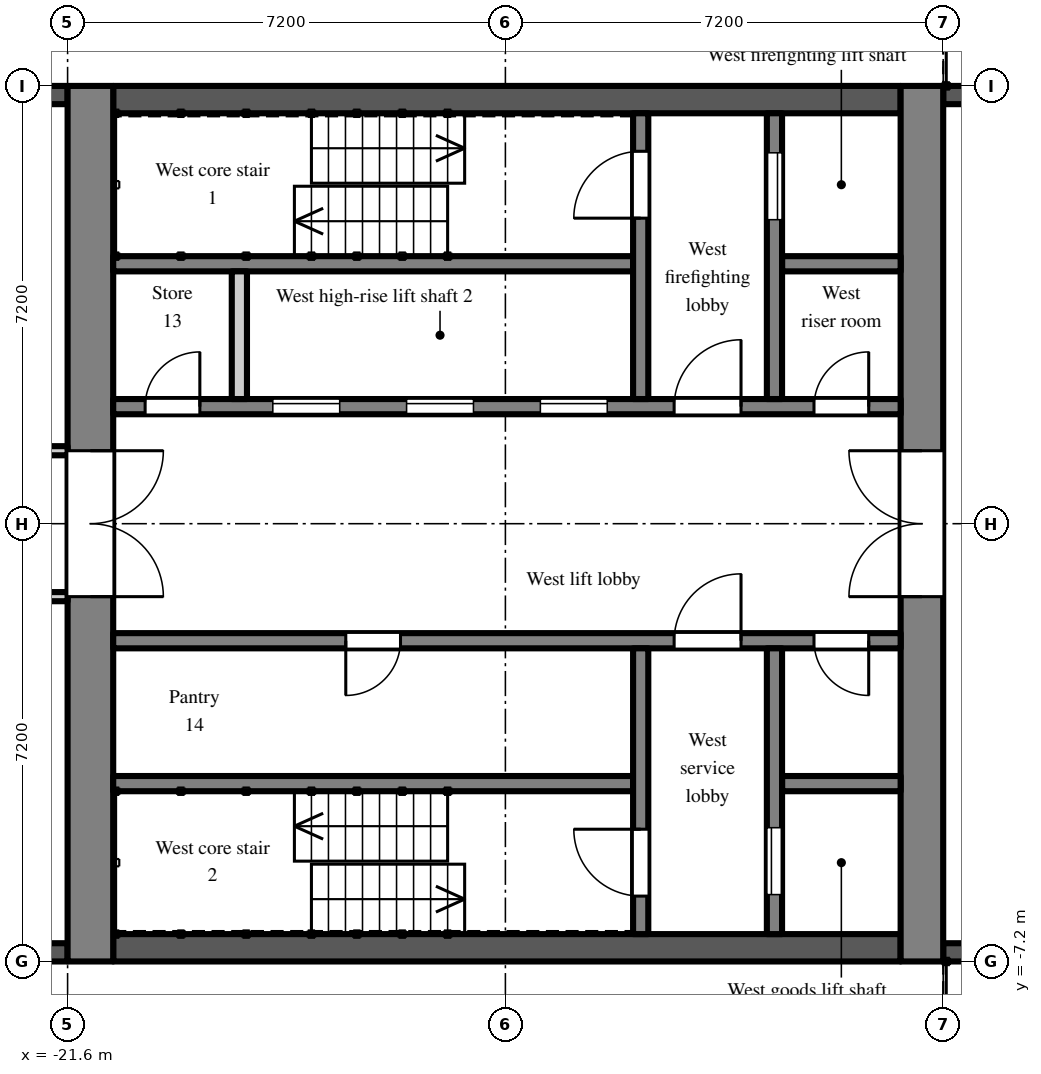
"""IFC4 building model, lengths in metres.
Left out: names, types, materials, properties, quantities, classifications, styles, units other than length and angle.
Written with IfcOpenShell. Run it as: python <this file> out.ifc"""

import sys

from ifc_helpers import new_model, si_unit, direction, frame, frame_2d, origin, place, context, subcontext, project, spatial, rectangle, extrude, element, fill, save


model = new_model("IFC4")
c1 = context("Model", 3, precision=1e-05, world=origin(), true_north=direction((0.0, 1.0)))
c2 = subcontext(c1, "Body", "Model", "MODEL_VIEW")
j1 = project(units=[si_unit("LENGTHUNIT", "METRE"), si_unit("PLANEANGLEUNIT", "RADIAN")], contexts=[c1])
p1 = place(None, origin())
s1 = spatial("IfcSite", under=j1, at=p1, CompositionType="ELEMENT")
p2 = place(p1, origin())
s2 = spatial("IfcBuilding", under=s1, at=p2, CompositionType="ELEMENT")
p3 = place(p2, frame((0.0, 0.0, 156.3)))
s3 = spatial("IfcBuildingStorey", under=s2, at=p3, CompositionType="ELEMENT", Elevation=156.3)
p4 = place(p3, frame((-4.2, 7.05, 0.0), z_axis=(0.0, 0.0, 1.0), x_axis=(-1.0, 0.0, 0.0)))
e1 = element("IfcWall", 1, at=p4, inside=s3, PredefinedType="SOLIDWALL", context=c2, shape_type="SweptSolid", body=[
    extrude(rectangle(XDim=3.0, YDim=0.3, at=frame_2d((1.5, 0.0))), origin(), (0.0, 0.0, 1.0), 2.2),
])
p5 = place(p3, frame((-21.6, 7.05, 0.0), z_axis=(0.0, 0.0, 1.0), x_axis=(-1.0, 0.0, 0.0)))
e2 = element("IfcWall", 2, at=p5, inside=s3, PredefinedType="SOLIDWALL", context=c2, shape_type="SweptSolid", body=[
    extrude(rectangle(XDim=2.7, YDim=0.3, at=frame_2d((1.35, 0.0))), origin(), (0.0, 0.0, 1.0), 2.2),
])
p6 = place(p5, frame((0.75, 0.0, 0.2)))
e3 = element("IfcOpeningElement", 3, at=p6, cuts=e2, PredefinedType="OPENING", context=c2, shape_type="SweptSolid", body=[
    extrude(rectangle(XDim=1.2, YDim=1.85, at=frame_2d((0.6, 0.925))), frame((0.0, 0.16, 0.0), z_axis=(0.0, -1.0, 0.0), x_axis=(1.0, 0.0, 0.0)), (0.0, 0.0, 1.0), 0.32),
])
p7 = place(p3, frame((-24.3, -7.05, 0.0), z_axis=(0.0, 0.0, 1.0), x_axis=(1.0, 0.0, 0.0)))
e4 = element("IfcWall", 4, at=p7, inside=s3, PredefinedType="SOLIDWALL", context=c2, shape_type="SweptSolid", body=[
    extrude(rectangle(XDim=2.7, YDim=0.3, at=frame_2d((1.35, 0.0))), origin(), (0.0, 0.0, 1.0), 2.2),
])
p8 = place(p3, frame((-7.2, -7.05, 0.0), z_axis=(0.0, 0.0, 1.0), x_axis=(1.0, 0.0, 0.0)))
e5 = element("IfcWall", 5, at=p8, inside=s3, PredefinedType="SOLIDWALL", context=c2, shape_type="SweptSolid", body=[
    extrude(rectangle(XDim=3.0, YDim=0.3, at=frame_2d((1.5, 0.0))), origin(), (0.0, 0.0, 1.0), 2.2),
])
p9 = place(p3, frame((-7.55, -7.2, 0.0), z_axis=(0.0, 0.0, 1.0), x_axis=(0.0, 1.0, 0.0)))
e6 = element("IfcWall", 6, at=p9, inside=s3, PredefinedType="SHEAR", context=c2, shape_type="SweptSolid", body=[
    extrude(rectangle(XDim=14.4, YDim=0.7, at=frame_2d((7.2, 0.0))), origin(), (0.0, 0.0, 1.0), 2.6),
])
p10 = place(p9, frame((6.0, 0.0, 0.0)))
e7 = element("IfcOpeningElement", 7, at=p10, cuts=e6, PredefinedType="OPENING", context=c2, shape_type="SweptSolid", body=[
    extrude(rectangle(XDim=2.4, YDim=2.2, at=frame_2d((1.2, 1.1))), frame((0.0, 0.36, 0.0), z_axis=(0.0, -1.0, 0.0), x_axis=(1.0, 0.0, 0.0)), (0.0, 0.0, 1.0), 0.72),
])
p11 = place(p3, frame((-21.225, -7.2, 0.0), z_axis=(0.0, 0.0, 1.0), x_axis=(0.0, 1.0, 0.0)))
e8 = element("IfcWall", 8, at=p11, inside=s3, PredefinedType="SHEAR", context=c2, shape_type="SweptSolid", body=[
    extrude(rectangle(XDim=14.4, YDim=0.75, at=frame_2d((7.2, 0.0))), origin(), (0.0, 0.0, 1.0), 2.6),
])
p12 = place(p11, frame((6.0, 0.0, 0.0)))
e9 = element("IfcOpeningElement", 9, at=p12, cuts=e8, PredefinedType="OPENING", context=c2, shape_type="SweptSolid", body=[
    extrude(rectangle(XDim=2.4, YDim=2.2, at=frame_2d((1.2, 1.1))), frame((0.0, 0.385, 0.0), z_axis=(0.0, -1.0, 0.0), x_axis=(1.0, 0.0, 0.0)), (0.0, 0.0, 1.0), 0.77),
])
p13 = place(p3, frame((-7.9, 6.975, 0.0), z_axis=(0.0, 0.0, 1.0), x_axis=(-1.0, 0.0, 0.0)))
e10 = element("IfcWall", 10, at=p13, inside=s3, PredefinedType="SHEAR", context=c2, shape_type="SweptSolid", body=[
    extrude(rectangle(XDim=12.95, YDim=0.45, at=frame_2d((6.475, 0.0))), origin(), (0.0, 0.0, 1.0), 2.6),
])
p14 = place(p3, frame((-7.9, 1.925, 0.0), z_axis=(0.0, 0.0, 1.0), x_axis=(-1.0, 0.0, 0.0)))
e11 = element("IfcWall", 11, at=p14, inside=s3, PredefinedType="SHEAR", context=c2, shape_type="SweptSolid", body=[
    extrude(rectangle(XDim=12.95, YDim=0.25, at=frame_2d((6.475, 0.0))), origin(), (0.0, 0.0, 1.0), 2.6),
])
p15 = place(p14, frame((4.825, 0.0, 0.0)))
e12 = element("IfcOpeningElement", 12, at=p15, cuts=e11, PredefinedType="OPENING", context=c2, shape_type="SweptSolid", body=[
    extrude(rectangle(XDim=1.1, YDim=2.1, at=frame_2d((0.55, 1.05))), frame((0.0, 0.135, 0.0), z_axis=(0.0, -1.0, 0.0), x_axis=(1.0, 0.0, 0.0)), (0.0, 0.0, 1.0), 0.27),
])
p16 = place(p14, frame((7.025, 0.0, 0.0)))
e13 = element("IfcOpeningElement", 13, at=p16, cuts=e11, PredefinedType="OPENING", context=c2, shape_type="SweptSolid", body=[
    extrude(rectangle(XDim=1.1, YDim=2.1, at=frame_2d((0.55, 1.05))), frame((0.0, 0.135, 0.0), z_axis=(0.0, -1.0, 0.0), x_axis=(1.0, 0.0, 0.0)), (0.0, 0.0, 1.0), 0.27),
])
p17 = place(p14, frame((9.225, 0.0, 0.0)))
e14 = element("IfcOpeningElement", 14, at=p17, cuts=e11, PredefinedType="OPENING", context=c2, shape_type="SweptSolid", body=[
    extrude(rectangle(XDim=1.1, YDim=2.1, at=frame_2d((0.55, 1.05))), frame((0.0, 0.135, 0.0), z_axis=(0.0, -1.0, 0.0), x_axis=(1.0, 0.0, 0.0)), (0.0, 0.0, 1.0), 0.27),
])
p18 = place(p14, frame((0.525, 0.0, 0.0)))
e15 = element("IfcOpeningElement", 15, at=p18, cuts=e11, PredefinedType="OPENING", context=c2, shape_type="SweptSolid", body=[
    extrude(rectangle(XDim=0.9, YDim=2.1, at=frame_2d((0.45, 1.05))), frame((0.0, 0.135, 0.0), z_axis=(0.0, -1.0, 0.0), x_axis=(1.0, 0.0, 0.0)), (0.0, 0.0, 1.0), 0.27),
])
p19 = place(p14, frame((2.625, 0.0, 0.0)))
e16 = element("IfcOpeningElement", 16, at=p19, cuts=e11, PredefinedType="OPENING", context=c2, shape_type="SweptSolid", body=[
    extrude(rectangle(XDim=1.1, YDim=2.1, at=frame_2d((0.55, 1.05))), frame((0.0, 0.135, 0.0), z_axis=(0.0, -1.0, 0.0), x_axis=(1.0, 0.0, 0.0)), (0.0, 0.0, 1.0), 0.27),
])
p20 = place(p14, frame((11.525, 0.0, 0.0)))
e17 = element("IfcOpeningElement", 17, at=p20, cuts=e11, PredefinedType="OPENING", context=c2, shape_type="SweptSolid", body=[
    extrude(rectangle(XDim=0.9, YDim=2.1, at=frame_2d((0.45, 1.05))), frame((0.0, 0.135, 0.0), z_axis=(0.0, -1.0, 0.0), x_axis=(1.0, 0.0, 0.0)), (0.0, 0.0, 1.0), 0.27),
])
p21 = place(p3, frame((-7.9, 4.275, 0.0), z_axis=(0.0, 0.0, 1.0), x_axis=(-1.0, 0.0, 0.0)))
e18 = element("IfcWall", 18, at=p21, inside=s3, PredefinedType="SHEAR", context=c2, shape_type="SweptSolid", body=[
    extrude(rectangle(XDim=1.95, YDim=0.25, at=frame_2d((0.975, 0.0))), origin(), (0.0, 0.0, 1.0), 2.6),
])
p22 = place(p3, frame((-12.3, 4.275, 0.0), z_axis=(0.0, 0.0, 1.0), x_axis=(-1.0, 0.0, 0.0)))
e19 = element("IfcWall", 19, at=p22, inside=s3, PredefinedType="SHEAR", context=c2, shape_type="SweptSolid", body=[
    extrude(rectangle(XDim=8.55, YDim=0.25, at=frame_2d((4.275, 0.0))), origin(), (0.0, 0.0, 1.0), 2.6),
])
p23 = place(p3, frame((-9.975, 2.05, 0.0), z_axis=(0.0, 0.0, 1.0), x_axis=(0.0, 1.0, 0.0)))
e20 = element("IfcWall", 20, at=p23, inside=s3, PredefinedType="SHEAR", context=c2, shape_type="SweptSolid", body=[
    extrude(rectangle(XDim=4.7, YDim=0.25, at=frame_2d((2.35, 0.0))), origin(), (0.0, 0.0, 1.0), 2.6),
])
p24 = place(p23, frame((2.95, 0.0, 0.0)))
e21 = element("IfcOpeningElement", 21, at=p24, cuts=e20, PredefinedType="OPENING", context=c2, shape_type="SweptSolid", body=[
    extrude(rectangle(XDim=1.1, YDim=2.1, at=frame_2d((0.55, 1.05))), frame((0.0, 0.135, 0.0), z_axis=(0.0, -1.0, 0.0), x_axis=(1.0, 0.0, 0.0)), (0.0, 0.0, 1.0), 0.27),
])
p25 = place(p3, frame((-12.175, 2.05, 0.0), z_axis=(0.0, 0.0, 1.0), x_axis=(0.0, 1.0, 0.0)))
e22 = element("IfcWall", 22, at=p25, inside=s3, PredefinedType="SHEAR", context=c2, shape_type="SweptSolid", body=[
    extrude(rectangle(XDim=4.7, YDim=0.25, at=frame_2d((2.35, 0.0))), origin(), (0.0, 0.0, 1.0), 2.6),
])
p26 = place(p25, frame((2.975, 0.0, 0.0)))
e23 = element("IfcOpeningElement", 23, at=p26, cuts=e22, PredefinedType="OPENING", context=c2, shape_type="SweptSolid", body=[
    extrude(rectangle(XDim=1.1, YDim=2.1, at=frame_2d((0.55, 1.05))), frame((0.0, 0.135, 0.0), z_axis=(0.0, -1.0, 0.0), x_axis=(1.0, 0.0, 0.0)), (0.0, 0.0, 1.0), 0.27),
])
p27 = place(p3, frame((-18.775, 2.05, 0.0), z_axis=(0.0, 0.0, 1.0), x_axis=(0.0, 1.0, 0.0)))
e24 = element("IfcWall", 24, at=p27, inside=s3, PredefinedType="PARTITIONING", context=c2, shape_type="SweptSolid", body=[
    extrude(rectangle(XDim=2.1, YDim=0.25, at=frame_2d((1.05, 0.0))), origin(), (0.0, 0.0, 1.0), 2.6),
])
p28 = place(p3, frame((-7.9, -6.975, 0.0), z_axis=(0.0, 0.0, 1.0), x_axis=(-1.0, 0.0, 0.0)))
e25 = element("IfcWall", 25, at=p28, inside=s3, PredefinedType="SHEAR", context=c2, shape_type="SweptSolid", body=[
    extrude(rectangle(XDim=12.95, YDim=0.45, at=frame_2d((6.475, 0.0))), origin(), (0.0, 0.0, 1.0), 2.6),
])
p29 = place(p3, frame((-7.9, -1.925, 0.0), z_axis=(0.0, 0.0, 1.0), x_axis=(-1.0, 0.0, 0.0)))
e26 = element("IfcWall", 26, at=p29, inside=s3, PredefinedType="SHEAR", context=c2, shape_type="SweptSolid", body=[
    extrude(rectangle(XDim=12.95, YDim=0.25, at=frame_2d((6.475, 0.0))), origin(), (0.0, 0.0, 1.0), 2.6),
])
p30 = place(p29, frame((0.525, 0.0, 0.0)))
e27 = element("IfcOpeningElement", 27, at=p30, cuts=e26, PredefinedType="OPENING", context=c2, shape_type="SweptSolid", body=[
    extrude(rectangle(XDim=0.9, YDim=2.1, at=frame_2d((0.45, 1.05))), frame((0.0, 0.135, 0.0), z_axis=(0.0, -1.0, 0.0), x_axis=(1.0, 0.0, 0.0)), (0.0, 0.0, 1.0), 0.27),
])
p31 = place(p29, frame((2.625, 0.0, 0.0)))
e28 = element("IfcOpeningElement", 28, at=p31, cuts=e26, PredefinedType="OPENING", context=c2, shape_type="SweptSolid", body=[
    extrude(rectangle(XDim=1.1, YDim=2.1, at=frame_2d((0.55, 1.05))), frame((0.0, 0.135, 0.0), z_axis=(0.0, -1.0, 0.0), x_axis=(1.0, 0.0, 0.0)), (0.0, 0.0, 1.0), 0.27),
])
p32 = place(p29, frame((8.225, 0.0, 0.0)))
e29 = element("IfcOpeningElement", 29, at=p32, cuts=e26, PredefinedType="OPENING", context=c2, shape_type="SweptSolid", body=[
    extrude(rectangle(XDim=0.9, YDim=2.1, at=frame_2d((0.45, 1.05))), frame((0.0, 0.135, 0.0), z_axis=(0.0, -1.0, 0.0), x_axis=(1.0, 0.0, 0.0)), (0.0, 0.0, 1.0), 0.27),
])
p33 = place(p3, frame((-7.9, -4.275, 0.0), z_axis=(0.0, 0.0, 1.0), x_axis=(-1.0, 0.0, 0.0)))
e30 = element("IfcWall", 30, at=p33, inside=s3, PredefinedType="SHEAR", context=c2, shape_type="SweptSolid", body=[
    extrude(rectangle(XDim=1.95, YDim=0.25, at=frame_2d((0.975, 0.0))), origin(), (0.0, 0.0, 1.0), 2.6),
])
p34 = place(p3, frame((-12.3, -4.275, 0.0), z_axis=(0.0, 0.0, 1.0), x_axis=(-1.0, 0.0, 0.0)))
e31 = element("IfcWall", 31, at=p34, inside=s3, PredefinedType="SHEAR", context=c2, shape_type="SweptSolid", body=[
    extrude(rectangle(XDim=8.55, YDim=0.25, at=frame_2d((4.275, 0.0))), origin(), (0.0, 0.0, 1.0), 2.6),
])
p35 = place(p3, frame((-9.975, -2.05, 0.0), z_axis=(0.0, 0.0, 1.0), x_axis=(0.0, -1.0, 0.0)))
e32 = element("IfcWall", 32, at=p35, inside=s3, PredefinedType="SHEAR", context=c2, shape_type="SweptSolid", body=[
    extrude(rectangle(XDim=4.7, YDim=0.25, at=frame_2d((2.35, 0.0))), origin(), (0.0, 0.0, 1.0), 2.6),
])
p36 = place(p35, frame((2.95, 0.0, 0.0)))
e33 = element("IfcOpeningElement", 33, at=p36, cuts=e32, PredefinedType="OPENING", context=c2, shape_type="SweptSolid", body=[
    extrude(rectangle(XDim=1.1, YDim=2.1, at=frame_2d((0.55, 1.05))), frame((0.0, 0.135, 0.0), z_axis=(0.0, -1.0, 0.0), x_axis=(1.0, 0.0, 0.0)), (0.0, 0.0, 1.0), 0.27),
])
p37 = place(p3, frame((-12.175, -2.05, 0.0), z_axis=(0.0, 0.0, 1.0), x_axis=(0.0, -1.0, 0.0)))
e34 = element("IfcWall", 34, at=p37, inside=s3, PredefinedType="SHEAR", context=c2, shape_type="SweptSolid", body=[
    extrude(rectangle(XDim=4.7, YDim=0.25, at=frame_2d((2.35, 0.0))), origin(), (0.0, 0.0, 1.0), 2.6),
])
p38 = place(p37, frame((2.975, 0.0, 0.0)))
e35 = element("IfcOpeningElement", 35, at=p38, cuts=e34, PredefinedType="OPENING", context=c2, shape_type="SweptSolid", body=[
    extrude(rectangle(XDim=1.1, YDim=2.1, at=frame_2d((0.55, 1.05))), frame((0.0, 0.135, 0.0), z_axis=(0.0, -1.0, 0.0), x_axis=(1.0, 0.0, 0.0)), (0.0, 0.0, 1.0), 0.27),
])
p39 = place(p3, frame((-36.5, -1.2, 0.0), z_axis=(0.0, 0.0, 1.0), x_axis=(1.0, 0.0, 0.0)))
e36 = element("IfcWall", 36, at=p39, inside=s3, PredefinedType="PARTITIONING", context=c2, shape_type="SweptSolid", body=[
    extrude(rectangle(XDim=14.9, YDim=0.15, at=frame_2d((7.45, 0.0))), origin(), (0.0, 0.0, 1.0), 2.6),
])
p40 = place(p39, frame((10.4, 0.0, 0.0)))
e37 = element("IfcOpeningElement", 37, at=p40, cuts=e36, PredefinedType="OPENING", context=c2, shape_type="SweptSolid", body=[
    extrude(rectangle(XDim=1.8, YDim=2.1, at=frame_2d((0.9, 1.05))), frame((0.0, 0.085, 0.0), z_axis=(0.0, -1.0, 0.0), x_axis=(1.0, 0.0, 0.0)), (0.0, 0.0, 1.0), 0.17),
])
p41 = place(p39, frame((4.3, 0.0, 0.0)))
e38 = element("IfcOpeningElement", 38, at=p41, cuts=e36, PredefinedType="OPENING", context=c2, shape_type="SweptSolid", body=[
    extrude(rectangle(XDim=1.0, YDim=2.1, at=frame_2d((0.5, 1.05))), frame((0.0, 0.085, 0.0), z_axis=(0.0, -1.0, 0.0), x_axis=(1.0, 0.0, 0.0)), (0.0, 0.0, 1.0), 0.17),
])
p42 = place(p39, frame((1.15, 0.0, 0.0)))
e39 = element("IfcOpeningElement", 39, at=p42, cuts=e36, PredefinedType="OPENING", context=c2, shape_type="SweptSolid", body=[
    extrude(rectangle(XDim=1.8, YDim=2.1, at=frame_2d((0.9, 1.05))), frame((0.0, 0.085, 0.0), z_axis=(0.0, -1.0, 0.0), x_axis=(1.0, 0.0, 0.0)), (0.0, 0.0, 1.0), 0.17),
])
p43 = place(p3, frame((-36.5, 1.2, 0.0), z_axis=(0.0, 0.0, 1.0), x_axis=(1.0, 0.0, 0.0)))
e40 = element("IfcWall", 40, at=p43, inside=s3, PredefinedType="PARTITIONING", context=c2, shape_type="SweptSolid", body=[
    extrude(rectangle(XDim=14.9, YDim=0.15, at=frame_2d((7.45, 0.0))), origin(), (0.0, 0.0, 1.0), 2.6),
])
p44 = place(p43, frame((10.4, 0.0, 0.0)))
e41 = element("IfcOpeningElement", 41, at=p44, cuts=e40, PredefinedType="OPENING", context=c2, shape_type="SweptSolid", body=[
    extrude(rectangle(XDim=1.8, YDim=2.1, at=frame_2d((0.9, 1.05))), frame((0.0, 0.085, 0.0), z_axis=(0.0, -1.0, 0.0), x_axis=(1.0, 0.0, 0.0)), (0.0, 0.0, 1.0), 0.17),
])
p45 = place(p43, frame((5.45, 0.0, 0.0)))
e42 = element("IfcOpeningElement", 42, at=p45, cuts=e40, PredefinedType="OPENING", context=c2, shape_type="SweptSolid", body=[
    extrude(rectangle(XDim=0.9, YDim=2.1, at=frame_2d((0.45, 1.05))), frame((0.0, 0.085, 0.0), z_axis=(0.0, -1.0, 0.0), x_axis=(1.0, 0.0, 0.0)), (0.0, 0.0, 1.0), 0.17),
])
p46 = place(p43, frame((1.15, 0.0, 0.0)))
e43 = element("IfcOpeningElement", 43, at=p46, cuts=e40, PredefinedType="OPENING", context=c2, shape_type="SweptSolid", body=[
    extrude(rectangle(XDim=1.8, YDim=2.1, at=frame_2d((0.9, 1.05))), frame((0.0, 0.085, 0.0), z_axis=(0.0, -1.0, 0.0), x_axis=(1.0, 0.0, 0.0)), (0.0, 0.0, 1.0), 0.17),
])
p47 = place(p15, origin())
e44 = element("IfcDoor", 44, at=p47, inside=s3, OperationType="SLIDING_TO_LEFT", PredefinedType="DOOR", context=c2, shape_type="SweptSolid", body=[
    extrude(rectangle(XDim=1.1, YDim=2.1, at=frame_2d((0.55, 1.05))), frame((0.0, 0.025, 0.0), z_axis=(0.0, -1.0, 0.0), x_axis=(1.0, 0.0, 0.0)), (0.0, 0.0, 1.0), 0.05),
])
fill(e12, e44)
p48 = place(p16, origin())
e45 = element("IfcDoor", 45, at=p48, inside=s3, OperationType="SLIDING_TO_LEFT", PredefinedType="DOOR", context=c2, shape_type="SweptSolid", body=[
    extrude(rectangle(XDim=1.1, YDim=2.1, at=frame_2d((0.55, 1.05))), frame((0.0, 0.025, 0.0), z_axis=(0.0, -1.0, 0.0), x_axis=(1.0, 0.0, 0.0)), (0.0, 0.0, 1.0), 0.05),
])
fill(e13, e45)
p49 = place(p17, origin())
e46 = element("IfcDoor", 46, at=p49, inside=s3, OperationType="SLIDING_TO_LEFT", PredefinedType="DOOR", context=c2, shape_type="SweptSolid", body=[
    extrude(rectangle(XDim=1.1, YDim=2.1, at=frame_2d((0.55, 1.05))), frame((0.0, 0.025, 0.0), z_axis=(0.0, -1.0, 0.0), x_axis=(1.0, 0.0, 0.0)), (0.0, 0.0, 1.0), 0.05),
])
fill(e14, e46)
p50 = place(p24, origin())
e47 = element("IfcDoor", 47, at=p50, inside=s3, OperationType="SLIDING_TO_LEFT", PredefinedType="DOOR", context=c2, shape_type="SweptSolid", body=[
    extrude(rectangle(XDim=1.1, YDim=2.1, at=frame_2d((0.55, 1.05))), frame((0.0, 0.025, 0.0), z_axis=(0.0, -1.0, 0.0), x_axis=(1.0, 0.0, 0.0)), (0.0, 0.0, 1.0), 0.05),
])
fill(e21, e47)
p51 = place(p36, origin())
e48 = element("IfcDoor", 48, at=p51, inside=s3, OperationType="SLIDING_TO_LEFT", PredefinedType="DOOR", context=c2, shape_type="SweptSolid", body=[
    extrude(rectangle(XDim=1.1, YDim=2.1, at=frame_2d((0.55, 1.05))), frame((0.0, 0.025, 0.0), z_axis=(0.0, -1.0, 0.0), x_axis=(1.0, 0.0, 0.0)), (0.0, 0.0, 1.0), 0.05),
])
fill(e33, e48)
p52 = place(p26, origin())
e49 = element("IfcDoor", 49, at=p52, inside=s3, OperationType="SINGLE_SWING_LEFT", PredefinedType="DOOR", context=c2, shape_type="SweptSolid", body=[
    extrude(rectangle(XDim=1.1, YDim=2.1, at=frame_2d((0.55, 1.05))), frame((0.0, 0.025, 0.0), z_axis=(0.0, -1.0, 0.0), x_axis=(1.0, 0.0, 0.0)), (0.0, 0.0, 1.0), 0.05),
])
fill(e23, e49)
p53 = place(p38, frame((1.1, 0.0, 0.0), z_axis=(0.0, 0.0, 1.0), x_axis=(-1.0, 0.0, 0.0)))
e50 = element("IfcDoor", 50, at=p53, inside=s3, OperationType="SINGLE_SWING_RIGHT", PredefinedType="DOOR", context=c2, shape_type="SweptSolid", body=[
    extrude(rectangle(XDim=1.1, YDim=2.1, at=frame_2d((0.55, 1.05))), frame((0.0, 0.025, 0.0), z_axis=(0.0, -1.0, 0.0), x_axis=(1.0, 0.0, 0.0)), (0.0, 0.0, 1.0), 0.05),
])
fill(e35, e50)
p54 = place(p18, frame((0.9, 0.0, 0.0), z_axis=(0.0, 0.0, 1.0), x_axis=(-1.0, 0.0, 0.0)))
e51 = element("IfcDoor", 51, at=p54, inside=s3, OperationType="SINGLE_SWING_RIGHT", PredefinedType="DOOR", context=c2, shape_type="SweptSolid", body=[
    extrude(rectangle(XDim=0.9, YDim=2.1, at=frame_2d((0.45, 1.05))), frame((0.0, 0.025, 0.0), z_axis=(0.0, -1.0, 0.0), x_axis=(1.0, 0.0, 0.0)), (0.0, 0.0, 1.0), 0.05),
])
fill(e15, e51)
p55 = place(p30, origin())
e52 = element("IfcDoor", 52, at=p55, inside=s3, OperationType="SINGLE_SWING_LEFT", PredefinedType="DOOR", context=c2, shape_type="SweptSolid", body=[
    extrude(rectangle(XDim=0.9, YDim=2.1, at=frame_2d((0.45, 1.05))), frame((0.0, 0.025, 0.0), z_axis=(0.0, -1.0, 0.0), x_axis=(1.0, 0.0, 0.0)), (0.0, 0.0, 1.0), 0.05),
])
fill(e27, e52)
p56 = place(p19, frame((1.1, 0.0, 0.0), z_axis=(0.0, 0.0, 1.0), x_axis=(-1.0, 0.0, 0.0)))
e53 = element("IfcDoor", 53, at=p56, inside=s3, OperationType="SINGLE_SWING_RIGHT", PredefinedType="DOOR", context=c2, shape_type="SweptSolid", body=[
    extrude(rectangle(XDim=1.1, YDim=2.1, at=frame_2d((0.55, 1.05))), frame((0.0, 0.025, 0.0), z_axis=(0.0, -1.0, 0.0), x_axis=(1.0, 0.0, 0.0)), (0.0, 0.0, 1.0), 0.05),
])
fill(e16, e53)
p57 = place(p31, frame((1.1, 0.0, 0.0), z_axis=(0.0, 0.0, 1.0), x_axis=(-1.0, 0.0, 0.0)))
e54 = element("IfcDoor", 54, at=p57, inside=s3, OperationType="SINGLE_SWING_RIGHT", PredefinedType="DOOR", context=c2, shape_type="SweptSolid", body=[
    extrude(rectangle(XDim=1.1, YDim=2.1, at=frame_2d((0.55, 1.05))), frame((0.0, 0.025, 0.0), z_axis=(0.0, -1.0, 0.0), x_axis=(1.0, 0.0, 0.0)), (0.0, 0.0, 1.0), 0.05),
])
fill(e28, e54)
p58 = place(p10, origin())
e55 = element("IfcDoor", 55, at=p58, inside=s3, OperationType="DOUBLE_DOOR_DOUBLE_SWING", PredefinedType="DOOR", context=c2, shape_type="SweptSolid", body=[
    extrude(rectangle(XDim=2.4, YDim=2.2, at=frame_2d((1.2, 1.1))), frame((0.0, 0.025, 0.0), z_axis=(0.0, -1.0, 0.0), x_axis=(1.0, 0.0, 0.0)), (0.0, 0.0, 1.0), 0.05),
])
fill(e7, e55)
p59 = place(p12, frame((2.4, 0.0, 0.0), z_axis=(0.0, 0.0, 1.0), x_axis=(-1.0, 0.0, 0.0)))
e56 = element("IfcDoor", 56, at=p59, inside=s3, OperationType="DOUBLE_DOOR_DOUBLE_SWING", PredefinedType="DOOR", context=c2, shape_type="SweptSolid", body=[
    extrude(rectangle(XDim=2.4, YDim=2.2, at=frame_2d((1.2, 1.1))), frame((0.0, 0.025, 0.0), z_axis=(0.0, -1.0, 0.0), x_axis=(1.0, 0.0, 0.0)), (0.0, 0.0, 1.0), 0.05),
])
fill(e9, e56)
p60 = place(p20, frame((0.9, 0.0, 0.0), z_axis=(0.0, 0.0, 1.0), x_axis=(-1.0, 0.0, 0.0)))
e57 = element("IfcDoor", 57, at=p60, inside=s3, OperationType="SINGLE_SWING_RIGHT", PredefinedType="DOOR", context=c2, shape_type="SweptSolid", body=[
    extrude(rectangle(XDim=0.9, YDim=2.1, at=frame_2d((0.45, 1.05))), frame((0.0, 0.025, 0.0), z_axis=(0.0, -1.0, 0.0), x_axis=(1.0, 0.0, 0.0)), (0.0, 0.0, 1.0), 0.05),
])
fill(e17, e57)
p61 = place(p32, origin())
e58 = element("IfcDoor", 58, at=p61, inside=s3, OperationType="SINGLE_SWING_RIGHT", PredefinedType="DOOR", context=c2, shape_type="SweptSolid", body=[
    extrude(rectangle(XDim=0.9, YDim=2.1, at=frame_2d((0.45, 1.05))), frame((0.0, 0.025, 0.0), z_axis=(0.0, -1.0, 0.0), x_axis=(1.0, 0.0, 0.0)), (0.0, 0.0, 1.0), 0.05),
])
fill(e29, e58)
save(model, sys.argv[1])
